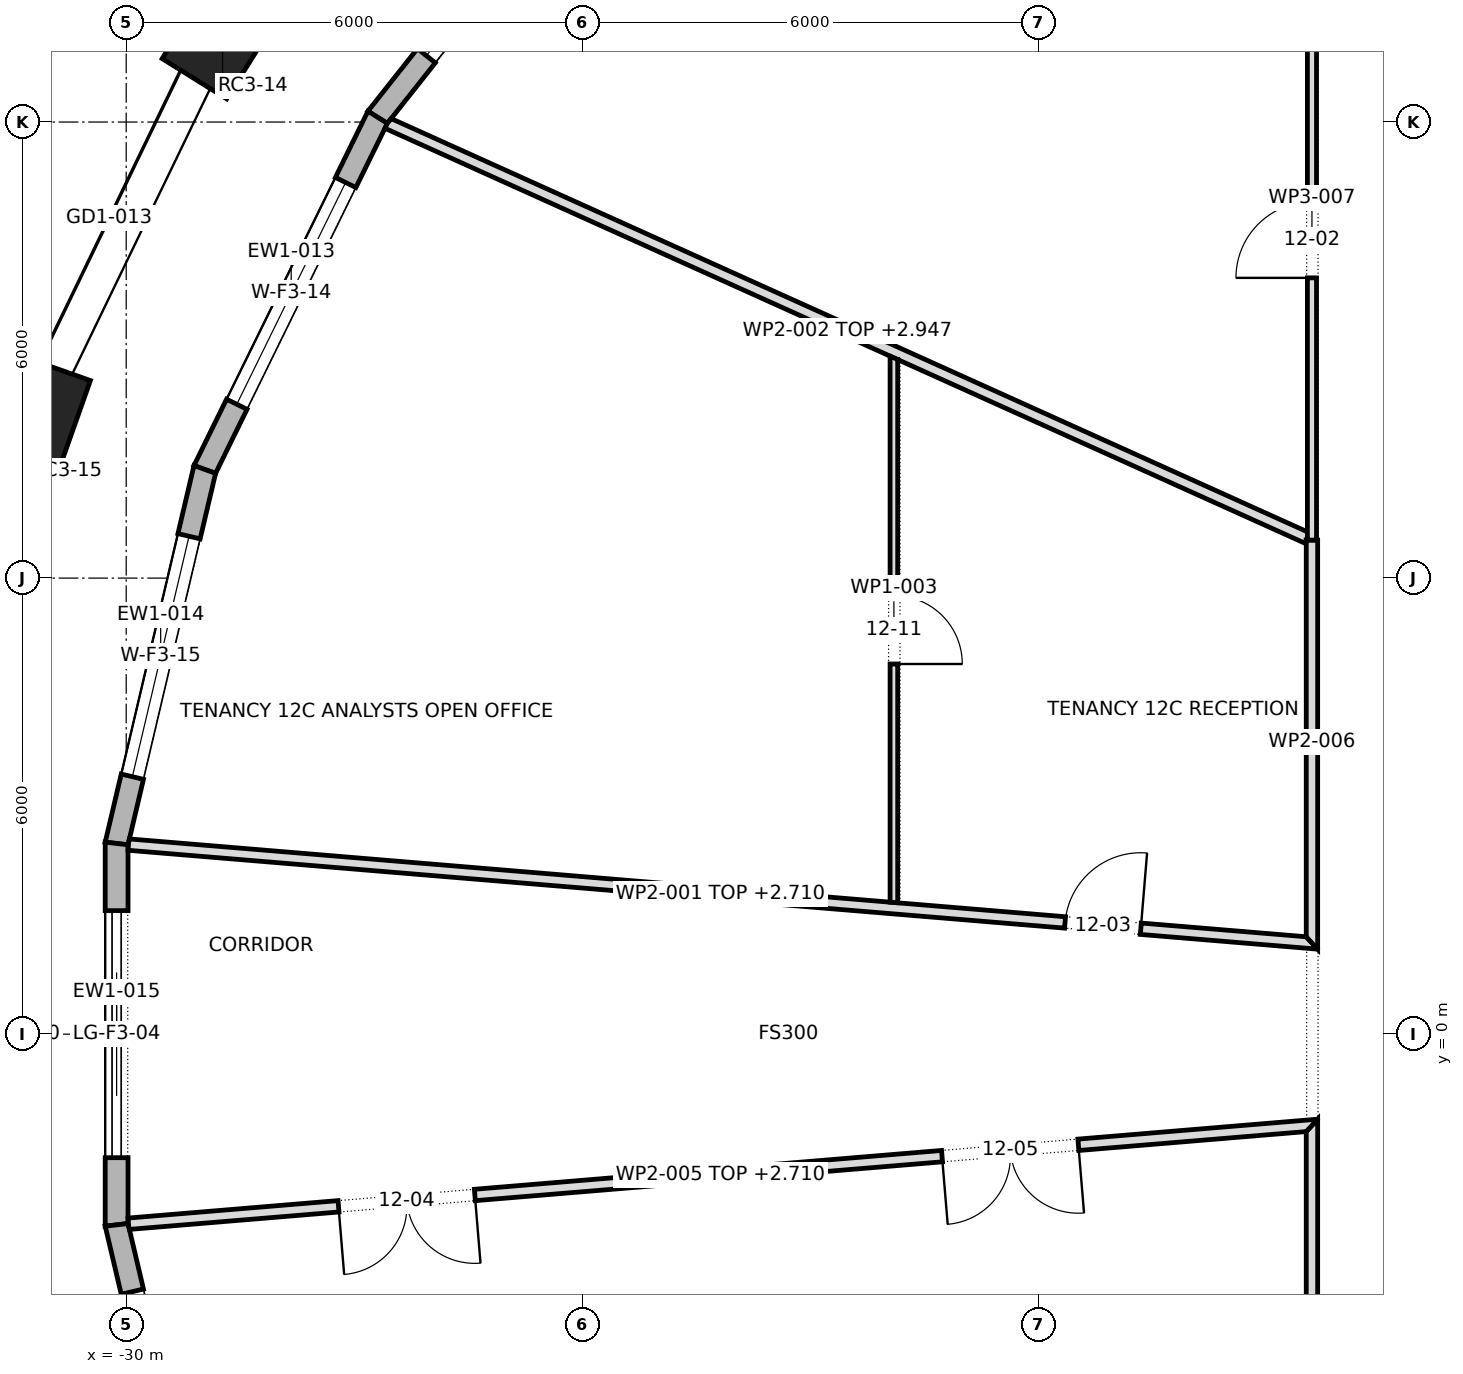
"""IFC4 building model, lengths in metres.
Left out: names, types, materials, properties, quantities, classifications, styles, units other than length and angle.
Written with IfcOpenShell. Run it as: python <this file> out.ifc"""

import sys

from ifc_helpers import new_model, si_unit, direction, frame, frame_2d, origin, origin_2d, place, context, subcontext, project, spatial, polyline, rectangle, outline, extrude, element, fill, save


model = new_model("IFC4")
c1 = context("Model", 3, precision=1e-05, world=origin(), true_north=direction((0.0, 1.0)))
c2 = subcontext(c1, "Body", "Model", "MODEL_VIEW")
j1 = project(units=[si_unit("LENGTHUNIT", "METRE"), si_unit("PLANEANGLEUNIT", "RADIAN")], contexts=[c1])
p1 = place(None, origin())
s1 = spatial("IfcSite", under=j1, at=p1, CompositionType="ELEMENT")
p2 = place(p1, origin())
s2 = spatial("IfcBuilding", under=s1, at=p2, CompositionType="ELEMENT")
p3 = place(p2, frame((0.0, 0.0, 186.9)))
s3 = spatial("IfcBuildingStorey", under=s2, at=p3, CompositionType="ELEMENT", Elevation=186.9)
for number, where, z_axis, x_axis in (
    (1, (-28.732, 13.164, 0.0), (0.0, 0.0, 1.0), (-0.529, -0.849, 0.0)),
    (2, (-31.176, 8.106, 0.0), (0.0, 0.0, 1.0), (-0.334, -0.943, 0.0)),
):
    element("IfcColumn", number, at=place(p3, frame(where, z_axis=z_axis, x_axis=x_axis)), inside=s3, PredefinedType="COLUMN", context=c2, shape_type="SweptSolid", body=[
        extrude(rectangle(XDim=1.4, YDim=1.0, at=origin_2d()), origin(), (0.0, 0.0, 1.0), 4.0),
    ])
p4 = place(p3, frame((-23.392, 16.23, 0.0), z_axis=(0.0, 0.0, 1.0), x_axis=(-0.620766467446, -0.78399553117, 0.0)))
e3 = element("IfcWall", 3, at=p4, inside=s3, PredefinedType="STANDARD", context=c2, shape_type="SweptSolid", body=[
    extrude(outline(polyline([(-0.015, -0.15), (5.332, -0.15), (5.3, 0.15), (0.015, 0.15), (-0.015, -0.15)])), origin(), (0.0, 0.0, 1.0), 3.7),
])
p5 = place(p4, frame((1.033, 0.0, 0.6)))
e4 = element("IfcOpeningElement", 4, at=p5, cuts=e3, PredefinedType="OPENING", context=c2, shape_type="SweptSolid", body=[
    extrude(rectangle(XDim=3.25, YDim=2.65, at=frame_2d((1.625, 1.325))), frame((0.0, 0.162, 0.0), z_axis=(0.0, -1.0, 0.0), x_axis=(1.0, 0.0, 0.0)), (0.0, 0.0, 1.0), 0.324),
])
p6 = place(p3, frame((-26.692, 12.062, 0.0), z_axis=(0.0, 0.0, 1.0), x_axis=(-0.440673883676, -0.897667270343, 0.0)))
e5 = element("IfcWall", 5, at=p6, inside=s3, PredefinedType="STANDARD", context=c2, shape_type="SweptSolid", body=[
    extrude(outline(polyline([(-0.016, -0.15), (5.178, -0.15), (5.144, 0.15), (0.016, 0.15), (-0.016, -0.15)])), origin(), (0.0, 0.0, 1.0), 3.7),
])
p7 = place(p6, frame((0.956, 0.0, 0.6)))
e6 = element("IfcOpeningElement", 6, at=p7, cuts=e5, PredefinedType="OPENING", context=c2, shape_type="SweptSolid", body=[
    extrude(rectangle(XDim=3.25, YDim=2.65, at=frame_2d((1.625, 1.325))), frame((0.0, 0.162, 0.0), z_axis=(0.0, -1.0, 0.0), x_axis=(1.0, 0.0, 0.0)), (0.0, 0.0, 1.0), 0.324),
])
p8 = place(p3, frame((-28.966, 7.429, 0.0), z_axis=(0.0, 0.0, 1.0), x_axis=(-0.229434992017, -0.973323987395, 0.0)))
e7 = element("IfcWall", 7, at=p8, inside=s3, PredefinedType="STANDARD", context=c2, shape_type="SweptSolid", body=[
    extrude(outline(polyline([(-0.017, -0.15), (5.073, -0.15), (5.038, 0.15), (0.017, 0.15), (-0.017, -0.15)])), origin(), (0.0, 0.0, 1.0), 3.7),
])
p9 = place(p8, frame((0.903, 0.0, 0.6)))
e8 = element("IfcOpeningElement", 8, at=p9, cuts=e7, PredefinedType="OPENING", context=c2, shape_type="SweptSolid", body=[
    extrude(rectangle(XDim=3.25, YDim=2.65, at=frame_2d((1.625, 1.325))), frame((0.0, 0.162, 0.0), z_axis=(0.0, -1.0, 0.0), x_axis=(1.0, 0.0, 0.0)), (0.0, 0.0, 1.0), 0.324),
])
p10 = place(p3, frame((-30.126, 2.509, 0.0), z_axis=(0.0, 0.0, 1.0), x_axis=(0.0, -1.0, 0.0)))
e9 = element("IfcWall", 9, at=p10, inside=s3, PredefinedType="STANDARD", context=c2, shape_type="SweptSolid", body=[
    extrude(outline(polyline([(-0.017, -0.15), (5.035, -0.15), (5.0, 0.15), (0.017, 0.15), (-0.017, -0.15)])), origin(), (0.0, 0.0, 1.0), 3.7),
])
p11 = place(p10, frame((0.884, 0.0, 0.0)))
e10 = element("IfcOpeningElement", 10, at=p11, cuts=e9, PredefinedType="OPENING", context=c2, shape_type="SweptSolid", body=[
    extrude(rectangle(XDim=3.25, YDim=3.25, at=frame_2d((1.625, 1.625))), frame((0.0, 0.162, 0.0), z_axis=(0.0, -1.0, 0.0), x_axis=(1.0, 0.0, 0.0)), (0.0, 0.0, 1.0), 0.324),
])
p12 = place(p3, frame((-30.126, -2.509, 0.0), z_axis=(0.0, 0.0, 1.0), x_axis=(0.229434992017, -0.973323987395, 0.0)))
e11 = element("IfcWall", 11, at=p12, inside=s3, PredefinedType="STANDARD", context=c2, shape_type="SweptSolid", body=[
    extrude(outline(polyline([(-0.017, -0.15), (5.072, -0.15), (5.039, 0.15), (0.017, 0.15), (-0.017, -0.15)])), origin(), (0.0, 0.0, 1.0), 3.7),
])
p13 = place(p12, frame((0.903, 0.0, 0.6)))
e12 = element("IfcOpeningElement", 12, at=p13, cuts=e11, PredefinedType="OPENING", context=c2, shape_type="SweptSolid", body=[
    extrude(rectangle(XDim=3.25, YDim=2.65, at=frame_2d((1.625, 1.325))), frame((0.0, 0.162, 0.0), z_axis=(0.0, -1.0, 0.0), x_axis=(1.0, 0.0, 0.0)), (0.0, 0.0, 1.0), 0.324),
])
p14 = place(p3, frame((-29.97, 2.494, 0.0), z_axis=(0.0, 0.0, 1.0), x_axis=(0.996561500002, -0.082856361942, 0.0)))
e13 = element("IfcWall", 13, at=p14, inside=s3, PredefinedType="PARTITIONING", context=c2, shape_type="SweptSolid", body=[
    extrude(outline(polyline([(15.705, -0.075), (15.705, -0.075), (15.624, 0.0), (15.542, 0.075), (13.6, 0.075), (11.658, 0.075), (9.716, 0.075), (7.774, 0.075), (5.832, 0.075), (3.89, 0.075), (1.948, 0.075), (0.006, 0.075), (0.0, 0.036), (0.0, -0.074), (0.0, -0.075), (1.963, -0.075), (3.926, -0.075), (5.889, -0.075), (7.853, -0.075), (9.816, -0.075), (11.779, -0.075), (13.742, -0.075), (15.705, -0.075)])), origin(), (0.0, 0.0, 1.0), 2.71),
])
p15 = place(p14, frame((12.364, 0.0, 0.0)))
e14 = element("IfcOpeningElement", 14, at=p15, cuts=e13, PredefinedType="OPENING", context=c2, shape_type="SweptSolid", body=[
    extrude(rectangle(XDim=1.0, YDim=2.1, at=frame_2d((0.5, 1.05))), frame((0.0, 0.087, 0.0), z_axis=(0.0, -1.0, 0.0), x_axis=(1.0, 0.0, 0.0)), (0.0, 0.0, 1.0), 0.174),
])
p16 = place(p3, frame((-26.565, 11.986, 0.0), z_axis=(0.0, 0.0, 1.0), x_axis=(0.911575557789, -0.411132584991, 0.0)))
e15 = element("IfcWall", 15, at=p16, inside=s3, PredefinedType="PARTITIONING", context=c2, shape_type="SweptSolid", body=[
    extrude(outline(polyline([(0.0, -0.075), (1.849, -0.075), (3.698, -0.075), (5.546, -0.075), (7.395, -0.075), (7.399, -0.073), (7.4, -0.075), (9.365, -0.075), (11.331, -0.075), (13.296, -0.075), (13.296, -0.075), (13.276, -0.031), (13.29, -0.024), (13.245, 0.075), (11.356, 0.075), (9.467, 0.075), (7.578, 0.075), (5.689, 0.075), (3.8, 0.075), (1.911, 0.075), (0.022, 0.075), (0.002, -0.003), (0.0, -0.07), (0.0, -0.075)])), origin(), (0.0, 0.0, 1.0), 2.947),
])
p17 = place(p3, frame((-19.9, 1.729, 0.0), z_axis=(0.0, 0.0, 1.0), x_axis=(0.0, 1.0, 0.0)))
e16 = element("IfcWall", 16, at=p17, inside=s3, PredefinedType="PARTITIONING", context=c2, shape_type="SweptSolid", body=[
    extrude(outline(polyline([(0.0, -0.05), (1.787, -0.05), (3.573, -0.05), (5.36, -0.05), (7.146, -0.05), (7.191, 0.049), (7.191, 0.05), (5.396, 0.05), (3.6, 0.05), (1.804, 0.05), (0.008, 0.05), (0.0, -0.048), (0.0, -0.05)])), origin(), (0.0, 0.0, 1.0), 3.7),
])
p18 = place(p17, frame((3.142, 0.0, 0.0)))
e17 = element("IfcOpeningElement", 17, at=p18, cuts=e16, PredefinedType="OPENING", context=c2, shape_type="SweptSolid", body=[
    extrude(rectangle(XDim=0.9, YDim=2.1, at=frame_2d((0.45, 1.05))), frame((0.0, 0.062, 0.0), z_axis=(0.0, -1.0, 0.0), x_axis=(1.0, 0.0, 0.0)), (0.0, 0.0, 1.0), 0.124),
])
p19 = place(p3, frame((-14.4, -14.475, 0.0), z_axis=(0.0, 0.0, 1.0), x_axis=(0.0, 1.0, 0.0)))
e18 = element("IfcWall", 18, at=p19, inside=s3, PredefinedType="PARTITIONING", context=c2, shape_type="SweptSolid", body=[
    extrude(outline(polyline([(0.15, -0.075), (2.037, -0.075), (3.923, -0.075), (5.81, -0.075), (7.697, -0.075), (9.583, -0.075), (11.47, -0.075), (13.357, -0.075), (13.194, 0.075), (11.309, 0.075), (9.424, 0.075), (7.539, 0.075), (5.655, 0.075), (3.77, 0.075), (1.885, 0.075), (0.0, 0.075), (0.15, -0.075)])), origin(), (0.0, 0.0, 1.0), 3.7),
])
p20 = place(p3, frame((-14.319, -1.193, 0.0), z_axis=(0.0, 0.0, 1.0), x_axis=(-0.996562676797, -0.08284220673, 0.0)))
e19 = element("IfcWall", 19, at=p20, inside=s3, PredefinedType="PARTITIONING", context=c2, shape_type="SweptSolid", body=[
    extrude(outline(polyline([(15.705, -0.075), (15.705, 0.038), (15.699, 0.075), (13.757, 0.075), (11.815, 0.075), (9.873, 0.075), (7.931, 0.075), (5.989, 0.075), (4.047, 0.075), (2.105, 0.075), (0.163, 0.075), (0.082, 0.0), (0.0, -0.075), (0.0, -0.075), (1.963, -0.075), (3.926, -0.075), (5.889, -0.075), (7.853, -0.075), (9.815, -0.075), (11.779, -0.075), (13.742, -0.075), (15.705, -0.075)])), origin(), (0.0, 0.0, 1.0), 2.71),
])
p21 = place(p20, frame((11.133, 0.0, 0.0)))
e20 = element("IfcOpeningElement", 20, at=p21, cuts=e19, PredefinedType="OPENING", context=c2, shape_type="SweptSolid", body=[
    extrude(rectangle(XDim=1.8, YDim=2.1, at=frame_2d((0.9, 1.05))), frame((0.0, 0.087, 0.0), z_axis=(0.0, -1.0, 0.0), x_axis=(1.0, 0.0, 0.0)), (0.0, 0.0, 1.0), 0.174),
])
p22 = place(p20, frame((3.165, 0.0, 0.0)))
e21 = element("IfcOpeningElement", 21, at=p22, cuts=e19, PredefinedType="OPENING", context=c2, shape_type="SweptSolid", body=[
    extrude(rectangle(XDim=1.8, YDim=2.1, at=frame_2d((0.9, 1.05))), frame((0.0, 0.087, 0.0), z_axis=(0.0, -1.0, 0.0), x_axis=(1.0, 0.0, 0.0)), (0.0, 0.0, 1.0), 0.174),
])
p23 = place(p3, frame((-14.4, 1.118, 0.0), z_axis=(0.0, 0.0, 1.0), x_axis=(0.0, 1.0, 0.0)))
e22 = element("IfcWall", 22, at=p23, inside=s3, PredefinedType="PARTITIONING", context=c2, shape_type="SweptSolid", body=[
    extrude(outline(polyline([(5.382, 0.075), (3.642, 0.075), (1.903, 0.075), (0.163, 0.075), (0.0, -0.075), (1.794, -0.075), (3.588, -0.075), (5.382, -0.075), (5.382, 0.075)])), origin(), (0.0, 0.0, 1.0), 3.7),
])
p24 = place(p3, frame((-14.4, 6.5, 0.0), z_axis=(0.0, 0.0, 1.0), x_axis=(0.0, 1.0, 0.0)))
e23 = element("IfcWall", 23, at=p24, inside=s3, PredefinedType="PARTITIONING", context=c2, shape_type="SweptSolid", body=[
    extrude(outline(polyline([(0.0, -0.06), (1.96, -0.06), (3.92, -0.06), (5.88, -0.06), (7.84, -0.06), (7.96, 0.06), (5.97, 0.06), (3.98, 0.06), (1.99, 0.06), (0.0, 0.06), (0.0, -0.06)])), origin(), (0.0, 0.0, 1.0), 3.7),
])
p25 = place(p24, frame((3.45, 0.0, 0.0)))
e24 = element("IfcOpeningElement", 24, at=p25, cuts=e23, PredefinedType="OPENING", context=c2, shape_type="SweptSolid", body=[
    extrude(rectangle(XDim=1.0, YDim=2.1, at=frame_2d((0.5, 1.05))), frame((0.0, 0.072, 0.0), z_axis=(0.0, -1.0, 0.0), x_axis=(1.0, 0.0, 0.0)), (0.0, 0.0, 1.0), 0.144),
])
p26 = place(p5, origin())
e25 = element("IfcWindow", 25, at=p26, inside=s3, PartitioningType="TRIPLE_PANEL_VERTICAL", PredefinedType="WINDOW", context=c2, shape_type="SweptSolid", body=[
    extrude(rectangle(XDim=3.25, YDim=2.65, at=frame_2d((1.625, 1.325))), frame((0.0, 0.03, 0.0), z_axis=(0.0, -1.0, 0.0), x_axis=(1.0, 0.0, 0.0)), (0.0, 0.0, 1.0), 0.06),
])
fill(e4, e25)
p27 = place(p7, origin())
e26 = element("IfcWindow", 26, at=p27, inside=s3, PartitioningType="TRIPLE_PANEL_VERTICAL", PredefinedType="WINDOW", context=c2, shape_type="SweptSolid", body=[
    extrude(rectangle(XDim=3.25, YDim=2.65, at=frame_2d((1.625, 1.325))), frame((0.0, 0.03, 0.0), z_axis=(0.0, -1.0, 0.0), x_axis=(1.0, 0.0, 0.0)), (0.0, 0.0, 1.0), 0.06),
])
fill(e6, e26)
p28 = place(p9, origin())
e27 = element("IfcWindow", 27, at=p28, inside=s3, PartitioningType="TRIPLE_PANEL_VERTICAL", PredefinedType="WINDOW", context=c2, shape_type="SweptSolid", body=[
    extrude(rectangle(XDim=3.25, YDim=2.65, at=frame_2d((1.625, 1.325))), frame((0.0, 0.03, 0.0), z_axis=(0.0, -1.0, 0.0), x_axis=(1.0, 0.0, 0.0)), (0.0, 0.0, 1.0), 0.06),
])
fill(e8, e27)
p29 = place(p11, origin())
e28 = element("IfcDoor", 28, at=p29, inside=s3, OperationType="DOUBLE_DOOR_SLIDING", PredefinedType="DOOR", context=c2, shape_type="SweptSolid", body=[
    extrude(rectangle(XDim=3.25, YDim=3.25, at=frame_2d((1.625, 1.625))), frame((0.0, 0.025, 0.0), z_axis=(0.0, -1.0, 0.0), x_axis=(1.0, 0.0, 0.0)), (0.0, 0.0, 1.0), 0.05),
])
fill(e10, e28)
p30 = place(p13, origin())
e29 = element("IfcWindow", 29, at=p30, inside=s3, PartitioningType="TRIPLE_PANEL_VERTICAL", PredefinedType="WINDOW", context=c2, shape_type="SweptSolid", body=[
    extrude(rectangle(XDim=3.25, YDim=2.65, at=frame_2d((1.625, 1.325))), frame((0.0, 0.03, 0.0), z_axis=(0.0, -1.0, 0.0), x_axis=(1.0, 0.0, 0.0)), (0.0, 0.0, 1.0), 0.06),
])
fill(e12, e29)
p31 = place(p25, origin())
e30 = element("IfcDoor", 30, at=p31, inside=s3, OperationType="SINGLE_SWING_RIGHT", PredefinedType="DOOR", context=c2, shape_type="SweptSolid", body=[
    extrude(rectangle(XDim=1.0, YDim=2.1, at=frame_2d((0.5, 1.05))), frame((0.0, 0.025, 0.0), z_axis=(0.0, -1.0, 0.0), x_axis=(1.0, 0.0, 0.0)), (0.0, 0.0, 1.0), 0.05),
])
fill(e24, e30)
p32 = place(p15, origin())
e31 = element("IfcDoor", 31, at=p32, inside=s3, OperationType="SINGLE_SWING_LEFT", PredefinedType="DOOR", context=c2, shape_type="SweptSolid", body=[
    extrude(rectangle(XDim=1.0, YDim=2.1, at=frame_2d((0.5, 1.05))), frame((0.0, 0.025, 0.0), z_axis=(0.0, -1.0, 0.0), x_axis=(1.0, 0.0, 0.0)), (0.0, 0.0, 1.0), 0.05),
])
fill(e14, e31)
p33 = place(p21, origin())
e32 = element("IfcDoor", 32, at=p33, inside=s3, OperationType="DOUBLE_DOOR_SINGLE_SWING", PredefinedType="DOOR", context=c2, shape_type="SweptSolid", body=[
    extrude(rectangle(XDim=1.8, YDim=2.1, at=frame_2d((0.9, 1.05))), frame((0.0, 0.025, 0.0), z_axis=(0.0, -1.0, 0.0), x_axis=(1.0, 0.0, 0.0)), (0.0, 0.0, 1.0), 0.05),
])
fill(e20, e32)
p34 = place(p22, origin())
e33 = element("IfcDoor", 33, at=p34, inside=s3, OperationType="DOUBLE_DOOR_SINGLE_SWING", PredefinedType="DOOR", context=c2, shape_type="SweptSolid", body=[
    extrude(rectangle(XDim=1.8, YDim=2.1, at=frame_2d((0.9, 1.05))), frame((0.0, 0.025, 0.0), z_axis=(0.0, -1.0, 0.0), x_axis=(1.0, 0.0, 0.0)), (0.0, 0.0, 1.0), 0.05),
])
fill(e21, e33)
p35 = place(p18, frame((0.9, 0.0, 0.0), z_axis=(0.0, 0.0, 1.0), x_axis=(-1.0, 0.0, 0.0)))
e34 = element("IfcDoor", 34, at=p35, inside=s3, OperationType="SINGLE_SWING_LEFT", PredefinedType="DOOR", context=c2, shape_type="SweptSolid", body=[
    extrude(rectangle(XDim=0.9, YDim=2.1, at=frame_2d((0.45, 1.05))), frame((0.0, 0.025, 0.0), z_axis=(0.0, -1.0, 0.0), x_axis=(1.0, 0.0, 0.0)), (0.0, 0.0, 1.0), 0.05),
])
fill(e17, e34)
save(model, sys.argv[1])
